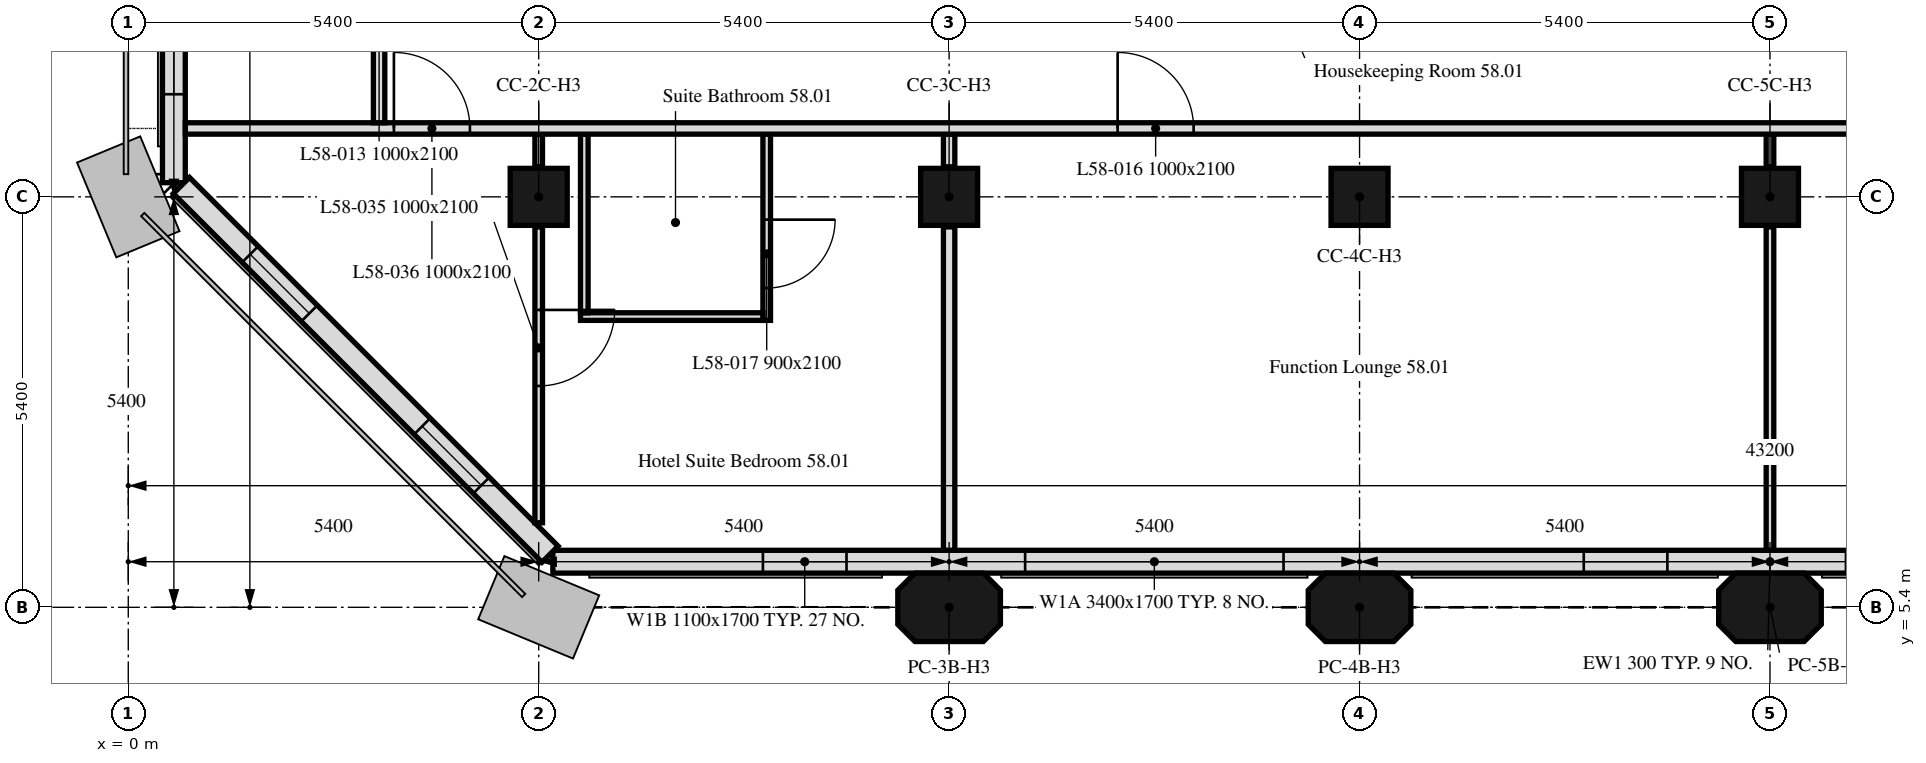
"""IFC4 building model, lengths in metres.
Left out: names, types, materials, properties, quantities, classifications, styles, units other than length and angle.
Written with IfcOpenShell. Run it as: python <this file> out.ifc"""

import sys

from ifc_helpers import new_model, si_unit, direction, frame, frame_2d, origin, origin_2d, place, context, subcontext, project, spatial, polyline, rectangle, outline, extrude, element, fill, save


model = new_model("IFC4")
c1 = context("Model", 3, precision=1e-05, world=origin(), true_north=direction((0.0, 1.0)))
c2 = subcontext(c1, "Body", "Model", "MODEL_VIEW")
j1 = project(units=[si_unit("LENGTHUNIT", "METRE"), si_unit("PLANEANGLEUNIT", "RADIAN")], contexts=[c1])
p1 = place(None, origin())
s1 = spatial("IfcSite", under=j1, at=p1, CompositionType="ELEMENT")
p2 = place(p1, origin())
s2 = spatial("IfcBuilding", under=s1, at=p2, CompositionType="ELEMENT")
p3 = place(p2, frame((0.0, 0.0, 230.2)))
s3 = spatial("IfcBuildingStorey", under=s2, at=p3, CompositionType="ELEMENT", Elevation=230.2)
for number, where, z_axis, x_axis in (
    (1, (10.8, 5.4, 0.0), (0.0, 0.0, 1.0), (1.0, 0.0, 0.0)),
    (2, (16.2, 5.4, 0.0), (0.0, 0.0, 1.0), (1.0, 0.0, 0.0)),
    (3, (21.6, 5.4, 0.0), (0.0, 0.0, 1.0), (1.0, 0.0, 0.0)),
):
    element("IfcColumn", number, at=place(p3, frame(where, z_axis=z_axis, x_axis=x_axis)), inside=s3, PredefinedType="COLUMN", context=c2, shape_type="SweptSolid", body=[
        extrude(outline(polyline([(-0.45, -0.45), (0.45, -0.45), (0.675, -0.225), (0.675, 0.225), (0.45, 0.45), (-0.45, 0.45), (-0.675, 0.225), (-0.675, -0.225), (-0.45, -0.45)])), origin(), (0.0, 0.0, 1.0), 2.8),
    ])
for number, where, z_axis, x_axis in (
    (4, (5.4, 10.8, 0.0), (0.0, 0.0, 1.0), (1.0, 0.0, 0.0)),
    (5, (10.8, 10.8, 0.0), (0.0, 0.0, 1.0), (1.0, 0.0, 0.0)),
    (6, (16.2, 10.8, 0.0), (0.0, 0.0, 1.0), (1.0, 0.0, 0.0)),
    (7, (21.6, 10.8, 0.0), (0.0, 0.0, 1.0), (1.0, 0.0, 0.0)),
):
    element("IfcColumn", number, at=place(p3, frame(where, z_axis=z_axis, x_axis=x_axis)), inside=s3, PredefinedType="COLUMN", context=c2, shape_type="SweptSolid", body=[
        extrude(rectangle(XDim=0.75, YDim=0.75, at=origin_2d()), origin(), (0.0, 0.0, 1.0), 2.8),
    ])
p4 = place(p3, frame((5.586, 6.0, 0.0), z_axis=(0.0, 0.0, 1.0), x_axis=(1.0, 0.0, 0.0)))
e8 = element("IfcWall", 8, at=p4, inside=s3, PredefinedType="SOLIDWALL", context=c2, shape_type="SweptSolid", body=[
    extrude(rectangle(XDim=32.027, YDim=0.3, at=frame_2d((16.014, 0.0))), origin(), (0.0, 0.0, 1.0), 2.8),
])
p5 = place(p4, frame((2.764, 0.0, 0.9)))
e9 = element("IfcOpeningElement", 9, at=p5, cuts=e8, PredefinedType="OPENING", context=c2, shape_type="SweptSolid", body=[
    extrude(rectangle(XDim=1.1, YDim=1.7, at=frame_2d((0.55, 0.85))), frame((0.0, 0.16, 0.0), z_axis=(0.0, -1.0, 0.0), x_axis=(1.0, 0.0, 0.0)), (0.0, 0.0, 1.0), 0.32),
])
p6 = place(p4, frame((6.214, 0.0, 0.9)))
e10 = element("IfcOpeningElement", 10, at=p6, cuts=e8, PredefinedType="OPENING", context=c2, shape_type="SweptSolid", body=[
    extrude(rectangle(XDim=3.4, YDim=1.7, at=frame_2d((1.7, 0.85))), frame((0.0, 0.16, 0.0), z_axis=(0.0, -1.0, 0.0), x_axis=(1.0, 0.0, 0.0)), (0.0, 0.0, 1.0), 0.32),
])
p7 = place(p4, frame((13.564, 0.0, 0.9)))
e11 = element("IfcOpeningElement", 11, at=p7, cuts=e8, PredefinedType="OPENING", context=c2, shape_type="SweptSolid", body=[
    extrude(rectangle(XDim=1.1, YDim=1.7, at=frame_2d((0.55, 0.85))), frame((0.0, 0.16, 0.0), z_axis=(0.0, -1.0, 0.0), x_axis=(1.0, 0.0, 0.0)), (0.0, 0.0, 1.0), 0.32),
])
p8 = place(p4, frame((17.014, 0.0, 0.9)))
e12 = element("IfcOpeningElement", 12, at=p8, cuts=e8, PredefinedType="OPENING", context=c2, shape_type="SweptSolid", body=[
    extrude(rectangle(XDim=3.4, YDim=1.7, at=frame_2d((1.7, 0.85))), frame((0.0, 0.16, 0.0), z_axis=(0.0, -1.0, 0.0), x_axis=(1.0, 0.0, 0.0)), (0.0, 0.0, 1.0), 0.32),
])
p9 = place(p4, frame((24.364, 0.0, 0.9)))
e13 = element("IfcOpeningElement", 13, at=p9, cuts=e8, PredefinedType="OPENING", context=c2, shape_type="SweptSolid", body=[
    extrude(rectangle(XDim=1.1, YDim=1.7, at=frame_2d((0.55, 0.85))), frame((0.0, 0.16, 0.0), z_axis=(0.0, -1.0, 0.0), x_axis=(1.0, 0.0, 0.0)), (0.0, 0.0, 1.0), 0.32),
])
p10 = place(p4, frame((27.814, 0.0, 0.9)))
e14 = element("IfcOpeningElement", 14, at=p10, cuts=e8, PredefinedType="OPENING", context=c2, shape_type="SweptSolid", body=[
    extrude(rectangle(XDim=3.4, YDim=1.7, at=frame_2d((1.7, 0.85))), frame((0.0, 0.16, 0.0), z_axis=(0.0, -1.0, 0.0), x_axis=(1.0, 0.0, 0.0)), (0.0, 0.0, 1.0), 0.32),
])
p11 = place(p3, frame((0.6, 43.014, 0.0), z_axis=(0.0, 0.0, 1.0), x_axis=(0.0, -1.0, 0.0)))
e15 = element("IfcWall", 15, at=p11, inside=s3, PredefinedType="SOLIDWALL", context=c2, shape_type="SweptSolid", body=[
    extrude(rectangle(XDim=32.027, YDim=0.3, at=frame_2d((16.014, 0.0))), origin(), (0.0, 0.0, 1.0), 2.8),
])
p12 = place(p11, frame((1.164, 0.0, 0.9)))
e16 = element("IfcOpeningElement", 16, at=p12, cuts=e15, PredefinedType="OPENING", context=c2, shape_type="SweptSolid", body=[
    extrude(rectangle(XDim=1.1, YDim=1.7, at=frame_2d((0.55, 0.85))), frame((0.0, 0.16, 0.0), z_axis=(0.0, -1.0, 0.0), x_axis=(1.0, 0.0, 0.0)), (0.0, 0.0, 1.0), 0.32),
])
p13 = place(p11, frame((2.589, 0.0, 0.9)))
e17 = element("IfcOpeningElement", 17, at=p13, cuts=e15, PredefinedType="OPENING", context=c2, shape_type="SweptSolid", body=[
    extrude(rectangle(XDim=0.65, YDim=1.7, at=frame_2d((0.325, 0.85))), frame((0.0, 0.16, 0.0), z_axis=(0.0, -1.0, 0.0), x_axis=(1.0, 0.0, 0.0)), (0.0, 0.0, 1.0), 0.32),
])
p14 = place(p11, frame((6.214, 0.0, 0.9)))
e18 = element("IfcOpeningElement", 18, at=p14, cuts=e15, PredefinedType="OPENING", context=c2, shape_type="SweptSolid", body=[
    extrude(rectangle(XDim=3.4, YDim=1.7, at=frame_2d((1.7, 0.85))), frame((0.0, 0.16, 0.0), z_axis=(0.0, -1.0, 0.0), x_axis=(1.0, 0.0, 0.0)), (0.0, 0.0, 1.0), 0.32),
])
p15 = place(p11, frame((11.964, 0.0, 0.9)))
e19 = element("IfcOpeningElement", 19, at=p15, cuts=e15, PredefinedType="OPENING", context=c2, shape_type="SweptSolid", body=[
    extrude(rectangle(XDim=1.1, YDim=1.7, at=frame_2d((0.55, 0.85))), frame((0.0, 0.16, 0.0), z_axis=(0.0, -1.0, 0.0), x_axis=(1.0, 0.0, 0.0)), (0.0, 0.0, 1.0), 0.32),
])
p16 = place(p11, frame((13.564, 0.0, 0.9)))
e20 = element("IfcOpeningElement", 20, at=p16, cuts=e15, PredefinedType="OPENING", context=c2, shape_type="SweptSolid", body=[
    extrude(rectangle(XDim=1.1, YDim=1.7, at=frame_2d((0.55, 0.85))), frame((0.0, 0.16, 0.0), z_axis=(0.0, -1.0, 0.0), x_axis=(1.0, 0.0, 0.0)), (0.0, 0.0, 1.0), 0.32),
])
p17 = place(p11, frame((17.014, 0.0, 0.9)))
e21 = element("IfcOpeningElement", 21, at=p17, cuts=e15, PredefinedType="OPENING", context=c2, shape_type="SweptSolid", body=[
    extrude(rectangle(XDim=3.4, YDim=1.7, at=frame_2d((1.7, 0.85))), frame((0.0, 0.16, 0.0), z_axis=(0.0, -1.0, 0.0), x_axis=(1.0, 0.0, 0.0)), (0.0, 0.0, 1.0), 0.32),
])
p18 = place(p11, frame((22.764, 0.0, 0.9)))
e22 = element("IfcOpeningElement", 22, at=p18, cuts=e15, PredefinedType="OPENING", context=c2, shape_type="SweptSolid", body=[
    extrude(rectangle(XDim=1.1, YDim=1.7, at=frame_2d((0.55, 0.85))), frame((0.0, 0.16, 0.0), z_axis=(0.0, -1.0, 0.0), x_axis=(1.0, 0.0, 0.0)), (0.0, 0.0, 1.0), 0.32),
])
p19 = place(p11, frame((24.364, 0.0, 0.9)))
e23 = element("IfcOpeningElement", 23, at=p19, cuts=e15, PredefinedType="OPENING", context=c2, shape_type="SweptSolid", body=[
    extrude(rectangle(XDim=1.1, YDim=1.7, at=frame_2d((0.55, 0.85))), frame((0.0, 0.16, 0.0), z_axis=(0.0, -1.0, 0.0), x_axis=(1.0, 0.0, 0.0)), (0.0, 0.0, 1.0), 0.32),
])
p20 = place(p11, frame((28.164, 0.0, 0.9)))
e24 = element("IfcOpeningElement", 24, at=p20, cuts=e15, PredefinedType="OPENING", context=c2, shape_type="SweptSolid", body=[
    extrude(rectangle(XDim=1.1, YDim=1.7, at=frame_2d((0.55, 0.85))), frame((0.0, 0.16, 0.0), z_axis=(0.0, -1.0, 0.0), x_axis=(1.0, 0.0, 0.0)), (0.0, 0.0, 1.0), 0.32),
])
p21 = place(p11, frame((29.764, 0.0, 0.9)))
e25 = element("IfcOpeningElement", 25, at=p21, cuts=e15, PredefinedType="OPENING", context=c2, shape_type="SweptSolid", body=[
    extrude(rectangle(XDim=1.1, YDim=1.7, at=frame_2d((0.55, 0.85))), frame((0.0, 0.16, 0.0), z_axis=(0.0, -1.0, 0.0), x_axis=(1.0, 0.0, 0.0)), (0.0, 0.0, 1.0), 0.32),
])
p22 = place(p3, frame((0.699, 10.949, 0.0), z_axis=(0.0, 0.0, 1.0), x_axis=(0.707106781187, -0.707106781187, 0.0)))
e26 = element("IfcWall", 26, at=p22, inside=s3, PredefinedType="SOLIDWALL", context=c2, shape_type="SweptSolid", body=[
    extrude(rectangle(XDim=6.86, YDim=0.3, at=frame_2d((3.43, 0.0))), origin(), (0.0, 0.0, 1.0), 2.8),
])
p23 = place(p22, frame((1.28, 0.0, 0.9)))
e27 = element("IfcOpeningElement", 27, at=p23, cuts=e26, PredefinedType="OPENING", context=c2, shape_type="SweptSolid", body=[
    extrude(rectangle(XDim=1.1, YDim=1.7, at=frame_2d((0.55, 0.85))), frame((0.0, 0.16, 0.0), z_axis=(0.0, -1.0, 0.0), x_axis=(1.0, 0.0, 0.0)), (0.0, 0.0, 1.0), 0.32),
])
p24 = place(p22, frame((4.48, 0.0, 0.9)))
e28 = element("IfcOpeningElement", 28, at=p24, cuts=e26, PredefinedType="OPENING", context=c2, shape_type="SweptSolid", body=[
    extrude(rectangle(XDim=1.1, YDim=1.7, at=frame_2d((0.55, 0.85))), frame((0.0, 0.16, 0.0), z_axis=(0.0, -1.0, 0.0), x_axis=(1.0, 0.0, 0.0)), (0.0, 0.0, 1.0), 0.32),
])
p25 = place(p3, frame((21.6, 11.625, 0.0), z_axis=(0.0, 0.0, 1.0), x_axis=(0.0, -1.0, 0.0)))
e29 = element("IfcWall", 29, at=p25, inside=s3, PredefinedType="PARTITIONING", context=c2, shape_type="SweptSolid", body=[
    extrude(rectangle(XDim=0.43, YDim=0.1, at=frame_2d((0.215, 0.0))), origin(), (0.0, 0.0, 1.0), 2.2),
])
p26 = place(p3, frame((21.6, 10.405, 0.0), z_axis=(0.0, 0.0, 1.0), x_axis=(0.0, -1.0, 0.0)))
e30 = element("IfcWall", 30, at=p26, inside=s3, PredefinedType="PARTITIONING", context=c2, shape_type="SweptSolid", body=[
    extrude(rectangle(XDim=4.254, YDim=0.1, at=frame_2d((2.127, 0.0))), origin(), (0.0, 0.0, 1.0), 2.2),
])
p27 = place(p3, frame((10.8, 11.625, 0.0), z_axis=(0.0, 0.0, 1.0), x_axis=(0.0, -1.0, 0.0)))
e31 = element("IfcWall", 31, at=p27, inside=s3, PredefinedType="PARTITIONING", context=c2, shape_type="SweptSolid", body=[
    extrude(rectangle(XDim=0.43, YDim=0.15, at=frame_2d((0.215, 0.0))), origin(), (0.0, 0.0, 1.0), 2.2),
])
p28 = place(p3, frame((10.8, 10.405, 0.0), z_axis=(0.0, 0.0, 1.0), x_axis=(0.0, -1.0, 0.0)))
e32 = element("IfcWall", 32, at=p28, inside=s3, PredefinedType="PARTITIONING", context=c2, shape_type="SweptSolid", body=[
    extrude(rectangle(XDim=4.254, YDim=0.15, at=frame_2d((2.127, 0.0))), origin(), (0.0, 0.0, 1.0), 2.2),
])
p29 = place(p3, frame((8.4, 11.625, 0.0), z_axis=(0.0, 0.0, 1.0), x_axis=(0.0, -1.0, 0.0)))
e33 = element("IfcWall", 33, at=p29, inside=s3, PredefinedType="PARTITIONING", context=c2, shape_type="SweptSolid", body=[
    extrude(rectangle(XDim=2.45, YDim=0.1, at=frame_2d((1.225, 0.0))), origin(), (0.0, 0.0, 1.0), 2.2),
])
p30 = place(p29, frame((1.125, 0.0, 0.0)))
e34 = element("IfcOpeningElement", 34, at=p30, cuts=e33, PredefinedType="OPENING", context=c2, shape_type="SweptSolid", body=[
    extrude(rectangle(XDim=0.9, YDim=2.1, at=frame_2d((0.45, 1.05))), frame((0.0, 0.05, 0.0), z_axis=(0.0, -1.0, 0.0), x_axis=(1.0, 0.0, 0.0)), (0.0, 0.0, 1.0), 0.1),
])
p31 = place(p3, frame((8.35, 9.225, 0.0), z_axis=(0.0, 0.0, 1.0), x_axis=(-1.0, 0.0, 0.0)))
e35 = element("IfcWall", 35, at=p31, inside=s3, PredefinedType="PARTITIONING", context=c2, shape_type="SweptSolid", body=[
    extrude(rectangle(XDim=2.4, YDim=0.1, at=frame_2d((1.2, 0.0))), origin(), (0.0, 0.0, 1.0), 2.05),
])
p32 = place(p3, frame((6.0, 9.275, 0.0), z_axis=(0.0, 0.0, 1.0), x_axis=(0.0, 1.0, 0.0)))
e36 = element("IfcWall", 36, at=p32, inside=s3, PredefinedType="PARTITIONING", context=c2, shape_type="SweptSolid", body=[
    extrude(rectangle(XDim=2.35, YDim=0.1, at=frame_2d((1.175, 0.0))), origin(), (0.0, 0.0, 1.0), 2.05),
])
p33 = place(p3, frame((5.4, 11.625, 0.0), z_axis=(0.0, 0.0, 1.0), x_axis=(0.0, -1.0, 0.0)))
e37 = element("IfcWall", 37, at=p33, inside=s3, PredefinedType="PARTITIONING", context=c2, shape_type="SweptSolid", body=[
    extrude(rectangle(XDim=0.43, YDim=0.1, at=frame_2d((0.215, 0.0))), origin(), (0.0, 0.0, 1.0), 2.8),
])
p34 = place(p3, frame((5.4, 10.405, 0.0), z_axis=(0.0, 0.0, 1.0), x_axis=(0.0, -1.0, 0.0)))
e38 = element("IfcWall", 38, at=p34, inside=s3, PredefinedType="PARTITIONING", context=c2, shape_type="SweptSolid", body=[
    extrude(rectangle(XDim=3.893, YDim=0.1, at=frame_2d((1.946, 0.0))), origin(), (0.0, 0.0, 1.0), 2.8),
])
p35 = place(p34, frame((1.093, 0.0, 0.0)))
e39 = element("IfcOpeningElement", 39, at=p35, cuts=e38, PredefinedType="OPENING", context=c2, shape_type="SweptSolid", body=[
    extrude(rectangle(XDim=1.0, YDim=2.1, at=frame_2d((0.5, 1.05))), frame((0.0, 0.05, 0.0), z_axis=(0.0, -1.0, 0.0), x_axis=(1.0, 0.0, 0.0)), (0.0, 0.0, 1.0), 0.1),
])
p36 = place(p3, frame((0.751, 11.7, 0.0), z_axis=(0.0, 0.0, 1.0), x_axis=(1.0, 0.0, 0.0)))
e40 = element("IfcWall", 40, at=p36, inside=s3, PredefinedType="PARTITIONING", context=c2, shape_type="SweptSolid", body=[
    extrude(rectangle(XDim=41.698, YDim=0.15, at=frame_2d((20.849, 0.0))), origin(), (0.0, 0.0, 1.0), 2.2),
])
p37 = place(p36, frame((33.866, 0.0, 0.0)))
e41 = element("IfcOpeningElement", 41, at=p37, cuts=e40, PredefinedType="OPENING", context=c2, shape_type="SweptSolid", body=[
    extrude(rectangle(XDim=1.0, YDim=2.1, at=frame_2d((0.5, 1.05))), frame((0.0, 0.075, 0.0), z_axis=(0.0, -1.0, 0.0), x_axis=(1.0, 0.0, 0.0)), (0.0, 0.0, 1.0), 0.15),
])
p38 = place(p36, frame((28.432, 0.0, 0.0)))
e42 = element("IfcOpeningElement", 42, at=p38, cuts=e40, PredefinedType="OPENING", context=c2, shape_type="SweptSolid", body=[
    extrude(rectangle(XDim=1.0, YDim=2.1, at=frame_2d((0.5, 1.05))), frame((0.0, 0.075, 0.0), z_axis=(0.0, -1.0, 0.0), x_axis=(1.0, 0.0, 0.0)), (0.0, 0.0, 1.0), 0.15),
])
p39 = place(p36, frame((12.266, 0.0, 0.0)))
e43 = element("IfcOpeningElement", 43, at=p39, cuts=e40, PredefinedType="OPENING", context=c2, shape_type="SweptSolid", body=[
    extrude(rectangle(XDim=1.0, YDim=2.1, at=frame_2d((0.5, 1.05))), frame((0.0, 0.075, 0.0), z_axis=(0.0, -1.0, 0.0), x_axis=(1.0, 0.0, 0.0)), (0.0, 0.0, 1.0), 0.15),
])
p40 = place(p36, frame((2.744, 0.0, 0.0)))
e44 = element("IfcOpeningElement", 44, at=p40, cuts=e40, PredefinedType="OPENING", context=c2, shape_type="SweptSolid", body=[
    extrude(rectangle(XDim=1.0, YDim=2.1, at=frame_2d((0.5, 1.05))), frame((0.0, 0.075, 0.0), z_axis=(0.0, -1.0, 0.0), x_axis=(1.0, 0.0, 0.0)), (0.0, 0.0, 1.0), 0.15),
])
p41 = place(p3, frame((3.3, 11.775, 0.0), z_axis=(0.0, 0.0, 1.0), x_axis=(0.0, 1.0, 0.0)))
e45 = element("IfcWall", 45, at=p41, inside=s3, PredefinedType="PARTITIONING", context=c2, shape_type="SweptSolid", body=[
    extrude(rectangle(XDim=30.45, YDim=0.15, at=frame_2d((15.225, 0.0))), origin(), (0.0, 0.0, 1.0), 2.2),
])
p42 = place(p41, frame((17.425, 0.0, 0.0)))
e46 = element("IfcOpeningElement", 46, at=p42, cuts=e45, PredefinedType="OPENING", context=c2, shape_type="SweptSolid", body=[
    extrude(rectangle(XDim=1.0, YDim=2.1, at=frame_2d((0.5, 1.05))), frame((0.0, 0.075, 0.0), z_axis=(0.0, -1.0, 0.0), x_axis=(1.0, 0.0, 0.0)), (0.0, 0.0, 1.0), 0.15),
])
p43 = place(p41, frame((1.675, 0.0, 0.0)))
e47 = element("IfcOpeningElement", 47, at=p43, cuts=e45, PredefinedType="OPENING", context=c2, shape_type="SweptSolid", body=[
    extrude(rectangle(XDim=1.0, YDim=2.1, at=frame_2d((0.5, 1.05))), frame((0.0, 0.075, 0.0), z_axis=(0.0, -1.0, 0.0), x_axis=(1.0, 0.0, 0.0)), (0.0, 0.0, 1.0), 0.15),
])
p44 = place(p41, frame((9.325, 0.0, 0.0)))
e48 = element("IfcOpeningElement", 48, at=p44, cuts=e45, PredefinedType="OPENING", context=c2, shape_type="SweptSolid", body=[
    extrude(rectangle(XDim=1.0, YDim=2.1, at=frame_2d((0.5, 1.05))), frame((0.0, 0.075, 0.0), z_axis=(0.0, -1.0, 0.0), x_axis=(1.0, 0.0, 0.0)), (0.0, 0.0, 1.0), 0.15),
])
p45 = place(p41, frame((23.258, 0.0, 0.0)))
e49 = element("IfcOpeningElement", 49, at=p45, cuts=e45, PredefinedType="OPENING", context=c2, shape_type="SweptSolid", body=[
    extrude(rectangle(XDim=1.0, YDim=2.1, at=frame_2d((0.5, 1.05))), frame((0.0, 0.075, 0.0), z_axis=(0.0, -1.0, 0.0), x_axis=(1.0, 0.0, 0.0)), (0.0, 0.0, 1.0), 0.15),
])
p46 = place(p5, origin())
e50 = element("IfcWindow", 50, at=p46, inside=s3, PartitioningType="SINGLE_PANEL", PredefinedType="WINDOW", context=c2, shape_type="SweptSolid", body=[
    extrude(rectangle(XDim=1.1, YDim=1.7, at=frame_2d((0.55, 0.85))), frame((0.0, 0.03, 0.0), z_axis=(0.0, -1.0, 0.0), x_axis=(1.0, 0.0, 0.0)), (0.0, 0.0, 1.0), 0.06),
])
fill(e9, e50)
p47 = place(p6, origin())
e51 = element("IfcWindow", 51, at=p47, inside=s3, PartitioningType="SINGLE_PANEL", PredefinedType="WINDOW", context=c2, shape_type="SweptSolid", body=[
    extrude(rectangle(XDim=3.4, YDim=1.7, at=frame_2d((1.7, 0.85))), frame((0.0, 0.03, 0.0), z_axis=(0.0, -1.0, 0.0), x_axis=(1.0, 0.0, 0.0)), (0.0, 0.0, 1.0), 0.06),
])
fill(e10, e51)
p48 = place(p7, origin())
e52 = element("IfcWindow", 52, at=p48, inside=s3, PartitioningType="SINGLE_PANEL", PredefinedType="WINDOW", context=c2, shape_type="SweptSolid", body=[
    extrude(rectangle(XDim=1.1, YDim=1.7, at=frame_2d((0.55, 0.85))), frame((0.0, 0.03, 0.0), z_axis=(0.0, -1.0, 0.0), x_axis=(1.0, 0.0, 0.0)), (0.0, 0.0, 1.0), 0.06),
])
fill(e11, e52)
p49 = place(p21, origin())
e53 = element("IfcWindow", 53, at=p49, inside=s3, PartitioningType="SINGLE_PANEL", PredefinedType="WINDOW", context=c2, shape_type="SweptSolid", body=[
    extrude(rectangle(XDim=1.1, YDim=1.7, at=frame_2d((0.55, 0.85))), frame((0.0, 0.03, 0.0), z_axis=(0.0, -1.0, 0.0), x_axis=(1.0, 0.0, 0.0)), (0.0, 0.0, 1.0), 0.06),
])
fill(e25, e53)
p50 = place(p23, origin())
e54 = element("IfcWindow", 54, at=p50, inside=s3, PartitioningType="SINGLE_PANEL", PredefinedType="WINDOW", context=c2, shape_type="SweptSolid", body=[
    extrude(rectangle(XDim=1.1, YDim=1.7, at=frame_2d((0.55, 0.85))), frame((0.0, 0.03, 0.0), z_axis=(0.0, -1.0, 0.0), x_axis=(1.0, 0.0, 0.0)), (0.0, 0.0, 1.0), 0.06),
])
fill(e27, e54)
p51 = place(p24, origin())
e55 = element("IfcWindow", 55, at=p51, inside=s3, PartitioningType="SINGLE_PANEL", PredefinedType="WINDOW", context=c2, shape_type="SweptSolid", body=[
    extrude(rectangle(XDim=1.1, YDim=1.7, at=frame_2d((0.55, 0.85))), frame((0.0, 0.03, 0.0), z_axis=(0.0, -1.0, 0.0), x_axis=(1.0, 0.0, 0.0)), (0.0, 0.0, 1.0), 0.06),
])
fill(e28, e55)
p52 = place(p39, origin())
e56 = element("IfcDoor", 56, at=p52, inside=s3, OperationType="SINGLE_SWING_LEFT", PredefinedType="DOOR", context=c2, shape_type="SweptSolid", body=[
    extrude(rectangle(XDim=1.0, YDim=2.1, at=frame_2d((0.5, 1.05))), frame((0.0, 0.025, 0.0), z_axis=(0.0, -1.0, 0.0), x_axis=(1.0, 0.0, 0.0)), (0.0, 0.0, 1.0), 0.05),
])
fill(e43, e56)
p53 = place(p30, origin())
e57 = element("IfcDoor", 57, at=p53, inside=s3, OperationType="SINGLE_SWING_RIGHT", PredefinedType="DOOR", context=c2, shape_type="SweptSolid", body=[
    extrude(rectangle(XDim=0.9, YDim=2.1, at=frame_2d((0.45, 1.05))), frame((0.0, 0.025, 0.0), z_axis=(0.0, -1.0, 0.0), x_axis=(1.0, 0.0, 0.0)), (0.0, 0.0, 1.0), 0.05),
])
fill(e34, e57)
p54 = place(p35, origin())
e58 = element("IfcDoor", 58, at=p54, inside=s3, OperationType="SINGLE_SWING_RIGHT", PredefinedType="DOOR", context=c2, shape_type="SweptSolid", body=[
    extrude(rectangle(XDim=1.0, YDim=2.1, at=frame_2d((0.5, 1.05))), frame((0.0, 0.025, 0.0), z_axis=(0.0, -1.0, 0.0), x_axis=(1.0, 0.0, 0.0)), (0.0, 0.0, 1.0), 0.05),
])
fill(e39, e58)
p55 = place(p40, origin())
e59 = element("IfcDoor", 59, at=p55, inside=s3, OperationType="SINGLE_SWING_RIGHT", PredefinedType="DOOR", context=c2, shape_type="SweptSolid", body=[
    extrude(rectangle(XDim=1.0, YDim=2.1, at=frame_2d((0.5, 1.05))), frame((0.0, 0.025, 0.0), z_axis=(0.0, -1.0, 0.0), x_axis=(1.0, 0.0, 0.0)), (0.0, 0.0, 1.0), 0.05),
])
fill(e44, e59)
save(model, sys.argv[1])
